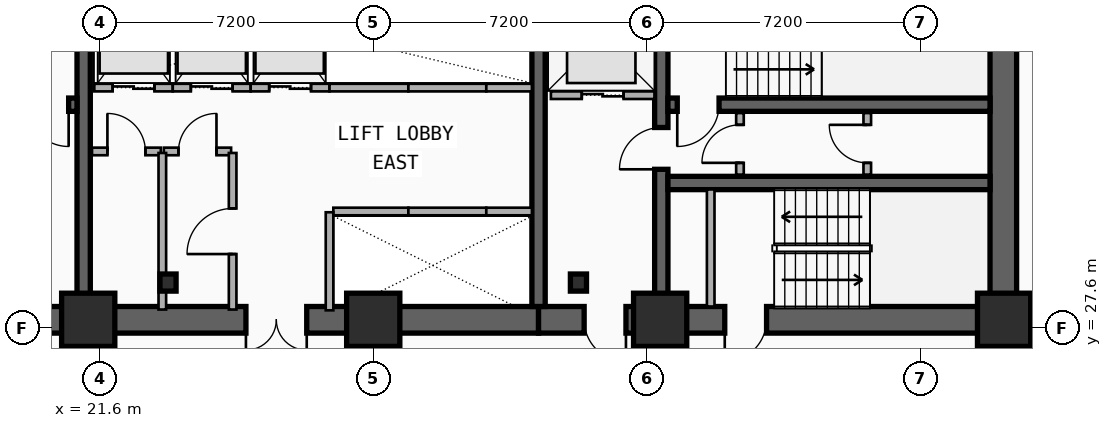
"""IFC4 building model, lengths in metres.
Left out: names, types, materials, properties, quantities, classifications, styles, units other than length and angle.
Written with IfcOpenShell. Run it as: python <this file> out.ifc"""

import sys

from ifc_helpers import new_model, si_unit, direction, frame, frame_2d, origin, origin_2d, place, context, subcontext, project, spatial, rectangle, i_section, extrude, element, fill, save


model = new_model("IFC4")
c1 = context("Model", 3, precision=1e-05, world=origin(), true_north=direction((0.0, 1.0)))
c2 = subcontext(c1, "Body", "Model", "MODEL_VIEW")
j1 = project(units=[si_unit("LENGTHUNIT", "METRE"), si_unit("PLANEANGLEUNIT", "RADIAN")], contexts=[c1])
p1 = place(None, origin())
s1 = spatial("IfcSite", under=j1, at=p1, CompositionType="ELEMENT")
p2 = place(p1, origin())
s2 = spatial("IfcBuilding", under=s1, at=p2, CompositionType="ELEMENT")
p3 = place(p2, frame((0.0, 0.0, 53.5)))
s3 = spatial("IfcBuildingStorey", under=s2, at=p3, CompositionType="ELEMENT", Elevation=53.5)
p4 = place(p3, frame((21.18, 27.82, 0.0), z_axis=(0.0, 0.0, 1.0), x_axis=(-1.0, 0.0, 0.0)))
e1 = element("IfcWall", 1, at=p4, inside=s3, PredefinedType="SHEAR", context=c2, shape_type="SweptSolid", body=[
    extrude(rectangle(XDim=9.03, YDim=0.7, at=frame_2d((4.515, 0.0))), origin(), (0.0, 0.0, 1.0), 3.5),
])
p5 = place(p4, frame((2.68, 0.0, 0.0)))
e2 = element("IfcOpeningElement", 2, at=p5, cuts=e1, PredefinedType="OPENING", context=c2, shape_type="SweptSolid", body=[
    extrude(rectangle(XDim=1.1, YDim=2.15, at=frame_2d((0.55, 1.075))), frame((0.0, 0.36, 0.0), z_axis=(0.0, -1.0, 0.0), x_axis=(1.0, 0.0, 0.0)), (0.0, 0.0, 1.0), 0.72),
])
p6 = place(p3, frame((33.15, 27.82, 0.0), z_axis=(0.0, 0.0, 1.0), x_axis=(-1.0, 0.0, 0.0)))
e3 = element("IfcWall", 3, at=p6, inside=s3, PredefinedType="SHEAR", context=c2, shape_type="SweptSolid", body=[
    extrude(rectangle(XDim=11.97, YDim=0.7, at=frame_2d((5.985, 0.0))), origin(), (0.0, 0.0, 1.0), 3.5),
])
p7 = place(p6, frame((6.1, 0.0, 0.0)))
e4 = element("IfcOpeningElement", 4, at=p7, cuts=e3, PredefinedType="OPENING", context=c2, shape_type="SweptSolid", body=[
    extrude(rectangle(XDim=1.6, YDim=2.2, at=frame_2d((0.8, 1.1))), frame((0.0, 0.36, 0.0), z_axis=(0.0, -1.0, 0.0), x_axis=(1.0, 0.0, 0.0)), (0.0, 0.0, 1.0), 0.72),
])
p8 = place(p3, frame((45.38, 27.82, 0.0), z_axis=(0.0, 0.0, 1.0), x_axis=(-1.0, 0.0, 0.0)))
e5 = element("IfcWall", 5, at=p8, inside=s3, PredefinedType="SHEAR", context=c2, shape_type="SweptSolid", body=[
    extrude(rectangle(XDim=12.23, YDim=0.7, at=frame_2d((6.115, 0.0))), origin(), (0.0, 0.0, 1.0), 3.5),
])
p9 = place(p8, frame((9.93, 0.0, 0.0)))
e6 = element("IfcOpeningElement", 6, at=p9, cuts=e5, PredefinedType="OPENING", context=c2, shape_type="SweptSolid", body=[
    extrude(rectangle(XDim=1.1, YDim=2.15, at=frame_2d((0.55, 1.075))), frame((0.0, 0.36, 0.0), z_axis=(0.0, -1.0, 0.0), x_axis=(1.0, 0.0, 0.0)), (0.0, 0.0, 1.0), 0.72),
])
p10 = place(p8, frame((6.23, 0.0, 0.0)))
e7 = element("IfcOpeningElement", 7, at=p10, cuts=e5, PredefinedType="OPENING", context=c2, shape_type="SweptSolid", body=[
    extrude(rectangle(XDim=1.1, YDim=2.15, at=frame_2d((0.55, 1.075))), frame((0.0, 0.36, 0.0), z_axis=(0.0, -1.0, 0.0), x_axis=(1.0, 0.0, 0.0)), (0.0, 0.0, 1.0), 0.72),
])
p11 = place(p3, frame((45.38, 28.17, 0.0), z_axis=(0.0, 0.0, 1.0), x_axis=(0.0, 1.0, 0.0)))
e8 = element("IfcWall", 8, at=p11, inside=s3, PredefinedType="SHEAR", context=c2, shape_type="SweptSolid", body=[
    extrude(rectangle(XDim=8.53, YDim=0.7, at=frame_2d((4.265, 0.0))), origin(), (0.0, 0.0, 1.0), 3.5),
])
for number, where, z_axis, x_axis in (
    (9, (21.18, 28.17, 0.0), (0.0, 0.0, 1.0), (0.0, 1.0, 0.0)),
    (10, (33.15, 28.17, 0.0), (0.0, 0.0, 1.0), (0.0, 1.0, 0.0)),
):
    element("IfcWall", number, at=place(p3, frame(where, z_axis=z_axis, x_axis=x_axis)), inside=s3, PredefinedType="SHEAR", context=c2, shape_type="SweptSolid", body=[
        extrude(rectangle(XDim=8.53, YDim=0.35, at=frame_2d((4.265, 0.0))), origin(), (0.0, 0.0, 1.0), 3.5),
    ])
p12 = place(p3, frame((36.38, 28.17, 0.0), z_axis=(0.0, 0.0, 1.0), x_axis=(0.0, 1.0, 0.0)))
e11 = element("IfcWall", 11, at=p12, inside=s3, PredefinedType="SHEAR", context=c2, shape_type="SweptSolid", body=[
    extrude(rectangle(XDim=8.53, YDim=0.35, at=frame_2d((4.265, 0.0))), origin(), (0.0, 0.0, 1.0), 3.5),
])
p13 = place(p12, frame((3.61, 0.0, 0.0)))
e12 = element("IfcOpeningElement", 12, at=p13, cuts=e11, PredefinedType="OPENING", context=c2, shape_type="SweptSolid", body=[
    extrude(rectangle(XDim=1.1, YDim=2.15, at=frame_2d((0.55, 1.075))), frame((0.0, 0.185, 0.0), z_axis=(0.0, -1.0, 0.0), x_axis=(1.0, 0.0, 0.0)), (0.0, 0.0, 1.0), 0.37),
])
p14 = place(p3, frame((21.005, 33.48, 0.0), z_axis=(0.0, 0.0, 1.0), x_axis=(-1.0, 0.0, 0.0)))
e13 = element("IfcWall", 13, at=p14, inside=s3, PredefinedType="SHEAR", context=c2, shape_type="SweptSolid", body=[
    extrude(rectangle(XDim=8.505, YDim=0.35, at=frame_2d((4.252, 0.0))), origin(), (0.0, 0.0, 1.0), 3.5),
])
p15 = place(p14, frame((0.22, 0.0, 0.0)))
e14 = element("IfcOpeningElement", 14, at=p15, cuts=e13, PredefinedType="OPENING", context=c2, shape_type="SweptSolid", body=[
    extrude(rectangle(XDim=1.1, YDim=2.15, at=frame_2d((0.55, 1.075))), frame((0.0, 0.185, 0.0), z_axis=(0.0, -1.0, 0.0), x_axis=(1.0, 0.0, 0.0)), (0.0, 0.0, 1.0), 0.37),
])
p16 = place(p3, frame((45.03, 33.48, 0.0), z_axis=(0.0, 0.0, 1.0), x_axis=(-1.0, 0.0, 0.0)))
e15 = element("IfcWall", 15, at=p16, inside=s3, PredefinedType="SHEAR", context=c2, shape_type="SweptSolid", body=[
    extrude(rectangle(XDim=8.475, YDim=0.35, at=frame_2d((4.238, 0.0))), origin(), (0.0, 0.0, 1.0), 3.5),
])
p17 = place(p16, frame((7.13, 0.0, 0.0)))
e16 = element("IfcOpeningElement", 16, at=p17, cuts=e15, PredefinedType="OPENING", context=c2, shape_type="SweptSolid", body=[
    extrude(rectangle(XDim=1.1, YDim=2.15, at=frame_2d((0.55, 1.075))), frame((0.0, 0.185, 0.0), z_axis=(0.0, -1.0, 0.0), x_axis=(1.0, 0.0, 0.0)), (0.0, 0.0, 1.0), 0.37),
])
p18 = place(p3, frame((36.555, 31.42, 0.0), z_axis=(0.0, 0.0, 1.0), x_axis=(1.0, 0.0, 0.0)))
e17 = element("IfcWall", 17, at=p18, inside=s3, PredefinedType="SHEAR", context=c2, shape_type="SweptSolid", body=[
    extrude(rectangle(XDim=8.475, YDim=0.35, at=frame_2d((4.238, 0.0))), origin(), (0.0, 0.0, 1.0), 3.5),
])
for number, where, z_axis, x_axis in (
    (18, (23.4, 28.8, 0.0), (0.0, 0.0, 1.0), (1.0, 0.0, 0.0)),
    (19, (34.2, 28.8, 0.0), (0.0, 0.0, 1.0), (1.0, 0.0, 0.0)),
):
    element("IfcColumn", number, at=place(p3, frame(where, z_axis=z_axis, x_axis=x_axis)), inside=s3, PredefinedType="COLUMN", context=c2, shape_type="SweptSolid", body=[
        extrude(i_section(OverallWidth=0.424, OverallDepth=0.45, WebThickness=0.041, FlangeThickness=0.065, FilletRadius=0.015, at=origin_2d()), origin(), (0.0, 0.0, 1.0), 3.5),
    ])
for number, where, z_axis, x_axis in (
    (20, (21.3, 27.82, 0.0), (0.0, 0.0, 1.0), (1.0, 0.0, 0.0)),
    (21, (28.8, 27.82, 0.0), (0.0, 0.0, 1.0), (1.0, 0.0, 0.0)),
    (22, (36.35, 27.82, 0.0), (0.0, 0.0, 1.0), (1.0, 0.0, 0.0)),
    (23, (45.4, 27.82, 0.0), (0.0, 0.0, 1.0), (1.0, 0.0, 0.0)),
):
    element("IfcColumn", number, at=place(p3, frame(where, z_axis=z_axis, x_axis=x_axis)), inside=s3, PredefinedType="COLUMN", context=c2, shape_type="SweptSolid", body=[
        extrude(rectangle(XDim=1.4, YDim=1.4, at=origin_2d()), origin(), (0.0, 0.0, 1.0), 3.5),
    ])
p19 = place(p3, frame((33.475, 33.73, 0.0), z_axis=(0.0, 0.0, 1.0), x_axis=(1.0, 0.0, 0.0)))
e24 = element("IfcWall", 24, at=p19, inside=s3, PredefinedType="PARTITIONING", context=c2, shape_type="SweptSolid", body=[
    extrude(rectangle(XDim=2.725, YDim=0.2, at=frame_2d((1.362, 0.0))), origin(), (0.0, 0.0, 1.0), 2.212),
])
p20 = place(p19, frame((0.812, 0.0, 0.0)))
e25 = element("IfcOpeningElement", 25, at=p20, cuts=e24, PredefinedType="OPENING", context=c2, shape_type="SweptSolid", body=[
    extrude(rectangle(XDim=1.1, YDim=2.15, at=frame_2d((0.55, 1.075))), frame((0.0, 0.11, 0.0), z_axis=(0.0, -1.0, 0.0), x_axis=(1.0, 0.0, 0.0)), (0.0, 0.0, 1.0), 0.22),
])
p21 = place(p3, frame((27.75, 30.67, 0.0), z_axis=(0.0, 0.0, 1.0), x_axis=(1.0, 0.0, 0.0)))
e26 = element("IfcWall", 26, at=p21, inside=s3, PredefinedType="PARTITIONING", context=c2, shape_type="SweptSolid", body=[
    extrude(rectangle(XDim=1.975, YDim=0.2, at=frame_2d((0.988, 0.0))), origin(), (0.0, 0.0, 1.0), 2.212),
])
p22 = place(p3, frame((27.65, 28.07, 0.0), z_axis=(0.0, 0.0, 1.0), x_axis=(0.0, 1.0, 0.0)))
e27 = element("IfcWall", 27, at=p22, inside=s3, PredefinedType="PARTITIONING", context=c2, shape_type="SweptSolid", body=[
    extrude(rectangle(XDim=2.58, YDim=0.2, at=frame_2d((1.29, 0.0))), origin(), (0.0, 0.0, 1.0), 2.212),
])
p23 = place(p3, frame((29.725, 30.67, 0.0), z_axis=(0.0, 0.0, 1.0), x_axis=(1.0, 0.0, 0.0)))
e28 = element("IfcWall", 28, at=p23, inside=s3, PredefinedType="PARTITIONING", context=c2, shape_type="SweptSolid", body=[
    extrude(rectangle(XDim=2.05, YDim=0.2, at=frame_2d((1.025, 0.0))), origin(), (0.0, 0.0, 1.0), 2.62),
])
p24 = place(p3, frame((31.775, 30.67, 0.0), z_axis=(0.0, 0.0, 1.0), x_axis=(1.0, 0.0, 0.0)))
e29 = element("IfcWall", 29, at=p24, inside=s3, PredefinedType="PARTITIONING", context=c2, shape_type="SweptSolid", body=[
    extrude(rectangle(XDim=1.2, YDim=0.2, at=frame_2d((0.6, 0.0))), origin(), (0.0, 0.0, 1.0), 2.62),
])
p25 = place(p3, frame((21.46, 33.93, 0.0), z_axis=(0.0, 0.0, 1.0), x_axis=(1.0, 0.0, 0.0)))
e30 = element("IfcWall", 30, at=p25, inside=s3, PredefinedType="PARTITIONING", context=c2, shape_type="SweptSolid", body=[
    extrude(rectangle(XDim=2.065, YDim=0.2, at=frame_2d((1.032, 0.0))), origin(), (0.0, 0.0, 1.0), 2.212),
])
p26 = place(p25, frame((0.482, 0.0, 0.0)))
e31 = element("IfcOpeningElement", 31, at=p26, cuts=e30, PredefinedType="OPENING", context=c2, shape_type="SweptSolid", body=[
    extrude(rectangle(XDim=1.1, YDim=2.15, at=frame_2d((0.55, 1.075))), frame((0.0, 0.11, 0.0), z_axis=(0.0, -1.0, 0.0), x_axis=(1.0, 0.0, 0.0)), (0.0, 0.0, 1.0), 0.22),
])
p27 = place(p3, frame((23.525, 33.93, 0.0), z_axis=(0.0, 0.0, 1.0), x_axis=(1.0, 0.0, 0.0)))
e32 = element("IfcWall", 32, at=p27, inside=s3, PredefinedType="PARTITIONING", context=c2, shape_type="SweptSolid", body=[
    extrude(rectangle(XDim=2.05, YDim=0.2, at=frame_2d((1.025, 0.0))), origin(), (0.0, 0.0, 1.0), 3.24),
])
p28 = place(p27, frame((0.475, 0.0, 0.0)))
e33 = element("IfcOpeningElement", 33, at=p28, cuts=e32, PredefinedType="OPENING", context=c2, shape_type="SweptSolid", body=[
    extrude(rectangle(XDim=1.1, YDim=2.15, at=frame_2d((0.55, 1.075))), frame((0.0, 0.11, 0.0), z_axis=(0.0, -1.0, 0.0), x_axis=(1.0, 0.0, 0.0)), (0.0, 0.0, 1.0), 0.22),
])
p29 = place(p3, frame((25.575, 33.93, 0.0), z_axis=(0.0, 0.0, 1.0), x_axis=(1.0, 0.0, 0.0)))
e34 = element("IfcWall", 34, at=p29, inside=s3, PredefinedType="PARTITIONING", context=c2, shape_type="SweptSolid", body=[
    extrude(rectangle(XDim=2.075, YDim=0.2, at=frame_2d((1.038, 0.0))), origin(), (0.0, 0.0, 1.0), 3.24),
])
p30 = place(p29, frame((0.488, 0.0, 0.0)))
e35 = element("IfcOpeningElement", 35, at=p30, cuts=e34, PredefinedType="OPENING", context=c2, shape_type="SweptSolid", body=[
    extrude(rectangle(XDim=1.1, YDim=2.15, at=frame_2d((0.55, 1.075))), frame((0.0, 0.11, 0.0), z_axis=(0.0, -1.0, 0.0), x_axis=(1.0, 0.0, 0.0)), (0.0, 0.0, 1.0), 0.22),
])
p31 = place(p3, frame((27.65, 33.93, 0.0), z_axis=(0.0, 0.0, 1.0), x_axis=(1.0, 0.0, 0.0)))
e36 = element("IfcWall", 36, at=p31, inside=s3, PredefinedType="PARTITIONING", context=c2, shape_type="SweptSolid", body=[
    extrude(rectangle(XDim=2.075, YDim=0.2, at=frame_2d((1.038, 0.0))), origin(), (0.0, 0.0, 1.0), 2.212),
])
p32 = place(p3, frame((29.725, 33.93, 0.0), z_axis=(0.0, 0.0, 1.0), x_axis=(1.0, 0.0, 0.0)))
e37 = element("IfcWall", 37, at=p32, inside=s3, PredefinedType="PARTITIONING", context=c2, shape_type="SweptSolid", body=[
    extrude(rectangle(XDim=2.05, YDim=0.2, at=frame_2d((1.025, 0.0))), origin(), (0.0, 0.0, 1.0), 3.24),
])
p33 = place(p3, frame((31.775, 33.93, 0.0), z_axis=(0.0, 0.0, 1.0), x_axis=(1.0, 0.0, 0.0)))
e38 = element("IfcWall", 38, at=p33, inside=s3, PredefinedType="PARTITIONING", context=c2, shape_type="SweptSolid", body=[
    extrude(rectangle(XDim=1.2, YDim=0.2, at=frame_2d((0.6, 0.0))), origin(), (0.0, 0.0, 1.0), 3.24),
])
p34 = place(p3, frame((37.68, 28.17, 0.0), z_axis=(0.0, 0.0, 1.0), x_axis=(0.0, 1.0, 0.0)))
e39 = element("IfcWall", 39, at=p34, inside=s3, PredefinedType="PARTITIONING", context=c2, shape_type="SweptSolid", body=[
    extrude(rectangle(XDim=3.08, YDim=0.2, at=frame_2d((1.54, 0.0))), origin(), (0.0, 0.0, 1.0), 2.62),
])
p35 = place(p3, frame((38.45, 31.64, 0.0), z_axis=(0.0, 0.0, 1.0), x_axis=(0.0, 1.0, 0.0)))
e40 = element("IfcWall", 40, at=p35, inside=s3, PredefinedType="PARTITIONING", context=c2, shape_type="SweptSolid", body=[
    extrude(rectangle(XDim=1.62, YDim=0.2, at=frame_2d((0.81, 0.0))), origin(), (0.0, 0.0, 1.0), 3.24),
])
p36 = place(p35, frame((0.31, 0.0, 0.0)))
e41 = element("IfcOpeningElement", 41, at=p36, cuts=e40, PredefinedType="OPENING", context=c2, shape_type="SweptSolid", body=[
    extrude(rectangle(XDim=1.0, YDim=2.15, at=frame_2d((0.5, 1.075))), frame((0.0, 0.11, 0.0), z_axis=(0.0, -1.0, 0.0), x_axis=(1.0, 0.0, 0.0)), (0.0, 0.0, 1.0), 0.22),
])
p37 = place(p3, frame((41.8, 31.64, 0.0), z_axis=(0.0, 0.0, 1.0), x_axis=(0.0, 1.0, 0.0)))
e42 = element("IfcWall", 42, at=p37, inside=s3, PredefinedType="PARTITIONING", context=c2, shape_type="SweptSolid", body=[
    extrude(rectangle(XDim=1.62, YDim=0.2, at=frame_2d((0.81, 0.0))), origin(), (0.0, 0.0, 1.0), 3.24),
])
p38 = place(p37, frame((0.31, 0.0, 0.0)))
e43 = element("IfcOpeningElement", 43, at=p38, cuts=e42, PredefinedType="OPENING", context=c2, shape_type="SweptSolid", body=[
    extrude(rectangle(XDim=1.0, YDim=2.15, at=frame_2d((0.5, 1.075))), frame((0.0, 0.11, 0.0), z_axis=(0.0, -1.0, 0.0), x_axis=(1.0, 0.0, 0.0)), (0.0, 0.0, 1.0), 0.22),
])
p39 = place(p3, frame((21.4, 32.25, 0.0), z_axis=(0.0, 0.0, 1.0), x_axis=(1.0, 0.0, 0.0)))
e44 = element("IfcWall", 44, at=p39, inside=s3, PredefinedType="PARTITIONING", context=c2, shape_type="SweptSolid", body=[
    extrude(rectangle(XDim=1.81, YDim=0.2, at=frame_2d((0.905, 0.0))), origin(), (0.0, 0.0, 1.0), 2.28),
])
p40 = place(p39, frame((0.405, 0.0, 0.0)))
e45 = element("IfcOpeningElement", 45, at=p40, cuts=e44, PredefinedType="OPENING", context=c2, shape_type="SweptSolid", body=[
    extrude(rectangle(XDim=1.0, YDim=2.15, at=frame_2d((0.5, 1.075))), frame((0.0, 0.11, 0.0), z_axis=(0.0, -1.0, 0.0), x_axis=(1.0, 0.0, 0.0)), (0.0, 0.0, 1.0), 0.22),
])
p41 = place(p3, frame((23.29, 32.25, 0.0), z_axis=(0.0, 0.0, 1.0), x_axis=(1.0, 0.0, 0.0)))
e46 = element("IfcWall", 46, at=p41, inside=s3, PredefinedType="PARTITIONING", context=c2, shape_type="SweptSolid", body=[
    extrude(rectangle(XDim=1.77, YDim=0.2, at=frame_2d((0.885, 0.0))), origin(), (0.0, 0.0, 1.0), 3.24),
])
p42 = place(p41, frame((0.385, 0.0, 0.0)))
e47 = element("IfcOpeningElement", 47, at=p42, cuts=e46, PredefinedType="OPENING", context=c2, shape_type="SweptSolid", body=[
    extrude(rectangle(XDim=1.0, YDim=2.15, at=frame_2d((0.5, 1.075))), frame((0.0, 0.11, 0.0), z_axis=(0.0, -1.0, 0.0), x_axis=(1.0, 0.0, 0.0)), (0.0, 0.0, 1.0), 0.22),
])
p43 = place(p3, frame((25.1, 28.09, 0.0), z_axis=(0.0, 0.0, 1.0), x_axis=(0.0, 1.0, 0.0)))
e48 = element("IfcWall", 48, at=p43, inside=s3, PredefinedType="PARTITIONING", context=c2, shape_type="SweptSolid", body=[
    extrude(rectangle(XDim=4.12, YDim=0.2, at=frame_2d((2.06, 0.0))), origin(), (0.0, 0.0, 1.0), 2.62),
])
p44 = place(p43, frame((1.46, 0.0, 0.0)))
e49 = element("IfcOpeningElement", 49, at=p44, cuts=e48, PredefinedType="OPENING", context=c2, shape_type="SweptSolid", body=[
    extrude(rectangle(XDim=1.2, YDim=2.15, at=frame_2d((0.6, 1.075))), frame((0.0, 0.11, 0.0), z_axis=(0.0, -1.0, 0.0), x_axis=(1.0, 0.0, 0.0)), (0.0, 0.0, 1.0), 0.22),
])
p45 = place(p3, frame((23.25, 28.09, 0.0), z_axis=(0.0, 0.0, 1.0), x_axis=(0.0, 1.0, 0.0)))
e50 = element("IfcWall", 50, at=p45, inside=s3, PredefinedType="PARTITIONING", context=c2, shape_type="SweptSolid", body=[
    extrude(rectangle(XDim=4.12, YDim=0.2, at=frame_2d((2.06, 0.0))), origin(), (0.0, 0.0, 1.0), 2.62),
])
p46 = place(p3, frame((45.41, 27.6, 0.0), z_axis=(0.0, 0.0, 1.0), x_axis=(1.0, 0.0, 0.0)))
e51 = element("IfcWall", 51, at=p46, inside=s3, PredefinedType="PARTITIONING", context=c2, shape_type="SweptSolid", body=[
    extrude(rectangle(XDim=0.91, YDim=0.16, at=frame_2d((0.455, 0.0))), origin(), (0.0, 0.0, 1.0), 2.28),
])
p47 = place(p20, origin())
e52 = element("IfcDoor", 52, at=p47, inside=s3, OperationType="DOUBLE_DOOR_SLIDING", PredefinedType="DOOR", context=c2, shape_type="SweptSolid", body=[
    extrude(rectangle(XDim=1.1, YDim=2.15, at=frame_2d((0.55, 1.075))), frame((0.0, 0.025, 0.0), z_axis=(0.0, -1.0, 0.0), x_axis=(1.0, 0.0, 0.0)), (0.0, 0.0, 1.0), 0.05),
])
fill(e25, e52)
p48 = place(p26, origin())
e53 = element("IfcDoor", 53, at=p48, inside=s3, OperationType="DOUBLE_DOOR_SLIDING", PredefinedType="DOOR", context=c2, shape_type="SweptSolid", body=[
    extrude(rectangle(XDim=1.1, YDim=2.15, at=frame_2d((0.55, 1.075))), frame((0.0, 0.025, 0.0), z_axis=(0.0, -1.0, 0.0), x_axis=(1.0, 0.0, 0.0)), (0.0, 0.0, 1.0), 0.05),
])
fill(e31, e53)
p49 = place(p28, origin())
e54 = element("IfcDoor", 54, at=p49, inside=s3, OperationType="DOUBLE_DOOR_SLIDING", PredefinedType="DOOR", context=c2, shape_type="SweptSolid", body=[
    extrude(rectangle(XDim=1.1, YDim=2.15, at=frame_2d((0.55, 1.075))), frame((0.0, 0.025, 0.0), z_axis=(0.0, -1.0, 0.0), x_axis=(1.0, 0.0, 0.0)), (0.0, 0.0, 1.0), 0.05),
])
fill(e33, e54)
p50 = place(p30, origin())
e55 = element("IfcDoor", 55, at=p50, inside=s3, OperationType="DOUBLE_DOOR_SLIDING", PredefinedType="DOOR", context=c2, shape_type="SweptSolid", body=[
    extrude(rectangle(XDim=1.1, YDim=2.15, at=frame_2d((0.55, 1.075))), frame((0.0, 0.025, 0.0), z_axis=(0.0, -1.0, 0.0), x_axis=(1.0, 0.0, 0.0)), (0.0, 0.0, 1.0), 0.05),
])
fill(e35, e55)
p51 = place(p15, origin())
e56 = element("IfcDoor", 56, at=p51, inside=s3, OperationType="SINGLE_SWING_LEFT", PredefinedType="DOOR", context=c2, shape_type="SweptSolid", body=[
    extrude(rectangle(XDim=1.1, YDim=2.15, at=frame_2d((0.55, 1.075))), frame((0.0, 0.025, 0.0), z_axis=(0.0, -1.0, 0.0), x_axis=(1.0, 0.0, 0.0)), (0.0, 0.0, 1.0), 0.05),
])
fill(e14, e56)
p52 = place(p17, origin())
e57 = element("IfcDoor", 57, at=p52, inside=s3, OperationType="SINGLE_SWING_RIGHT", PredefinedType="DOOR", context=c2, shape_type="SweptSolid", body=[
    extrude(rectangle(XDim=1.1, YDim=2.15, at=frame_2d((0.55, 1.075))), frame((0.0, 0.025, 0.0), z_axis=(0.0, -1.0, 0.0), x_axis=(1.0, 0.0, 0.0)), (0.0, 0.0, 1.0), 0.05),
])
fill(e16, e57)
p53 = place(p13, origin())
e58 = element("IfcDoor", 58, at=p53, inside=s3, OperationType="SINGLE_SWING_LEFT", PredefinedType="DOOR", context=c2, shape_type="SweptSolid", body=[
    extrude(rectangle(XDim=1.1, YDim=2.15, at=frame_2d((0.55, 1.075))), frame((0.0, 0.025, 0.0), z_axis=(0.0, -1.0, 0.0), x_axis=(1.0, 0.0, 0.0)), (0.0, 0.0, 1.0), 0.05),
])
fill(e12, e58)
p54 = place(p9, origin())
e59 = element("IfcDoor", 59, at=p54, inside=s3, OperationType="SINGLE_SWING_LEFT", PredefinedType="DOOR", context=c2, shape_type="SweptSolid", body=[
    extrude(rectangle(XDim=1.1, YDim=2.15, at=frame_2d((0.55, 1.075))), frame((0.0, 0.025, 0.0), z_axis=(0.0, -1.0, 0.0), x_axis=(1.0, 0.0, 0.0)), (0.0, 0.0, 1.0), 0.05),
])
fill(e6, e59)
p55 = place(p10, origin())
e60 = element("IfcDoor", 60, at=p55, inside=s3, OperationType="SINGLE_SWING_RIGHT", PredefinedType="DOOR", context=c2, shape_type="SweptSolid", body=[
    extrude(rectangle(XDim=1.1, YDim=2.15, at=frame_2d((0.55, 1.075))), frame((0.0, 0.025, 0.0), z_axis=(0.0, -1.0, 0.0), x_axis=(1.0, 0.0, 0.0)), (0.0, 0.0, 1.0), 0.05),
])
fill(e7, e60)
p56 = place(p7, origin())
e61 = element("IfcDoor", 61, at=p56, inside=s3, OperationType="SINGLE_SWING_LEFT", PredefinedType="DOOR", context=c2, shape_type="SweptSolid", body=[
    extrude(rectangle(XDim=1.6, YDim=2.2, at=frame_2d((0.8, 1.1))), frame((0.0, 0.025, 0.0), z_axis=(0.0, -1.0, 0.0), x_axis=(1.0, 0.0, 0.0)), (0.0, 0.0, 1.0), 0.05),
])
fill(e4, e61)
p57 = place(p36, origin())
e62 = element("IfcDoor", 62, at=p57, inside=s3, OperationType="SINGLE_SWING_LEFT", PredefinedType="DOOR", context=c2, shape_type="SweptSolid", body=[
    extrude(rectangle(XDim=1.0, YDim=2.15, at=frame_2d((0.5, 1.075))), frame((0.0, 0.025, 0.0), z_axis=(0.0, -1.0, 0.0), x_axis=(1.0, 0.0, 0.0)), (0.0, 0.0, 1.0), 0.05),
])
fill(e41, e62)
p58 = place(p38, origin())
e63 = element("IfcDoor", 63, at=p58, inside=s3, OperationType="SINGLE_SWING_RIGHT", PredefinedType="DOOR", context=c2, shape_type="SweptSolid", body=[
    extrude(rectangle(XDim=1.0, YDim=2.15, at=frame_2d((0.5, 1.075))), frame((0.0, 0.025, 0.0), z_axis=(0.0, -1.0, 0.0), x_axis=(1.0, 0.0, 0.0)), (0.0, 0.0, 1.0), 0.05),
])
fill(e43, e63)
p59 = place(p40, origin())
e64 = element("IfcDoor", 64, at=p59, inside=s3, OperationType="SINGLE_SWING_LEFT", PredefinedType="DOOR", context=c2, shape_type="SweptSolid", body=[
    extrude(rectangle(XDim=1.0, YDim=2.15, at=frame_2d((0.5, 1.075))), frame((0.0, 0.025, 0.0), z_axis=(0.0, -1.0, 0.0), x_axis=(1.0, 0.0, 0.0)), (0.0, 0.0, 1.0), 0.05),
])
fill(e45, e64)
p60 = place(p42, origin())
e65 = element("IfcDoor", 65, at=p60, inside=s3, OperationType="SINGLE_SWING_RIGHT", PredefinedType="DOOR", context=c2, shape_type="SweptSolid", body=[
    extrude(rectangle(XDim=1.0, YDim=2.15, at=frame_2d((0.5, 1.075))), frame((0.0, 0.025, 0.0), z_axis=(0.0, -1.0, 0.0), x_axis=(1.0, 0.0, 0.0)), (0.0, 0.0, 1.0), 0.05),
])
fill(e47, e65)
p61 = place(p44, origin())
e66 = element("IfcDoor", 66, at=p61, inside=s3, OperationType="SINGLE_SWING_LEFT", PredefinedType="DOOR", context=c2, shape_type="SweptSolid", body=[
    extrude(rectangle(XDim=1.2, YDim=2.15, at=frame_2d((0.6, 1.075))), frame((0.0, 0.025, 0.0), z_axis=(0.0, -1.0, 0.0), x_axis=(1.0, 0.0, 0.0)), (0.0, 0.0, 1.0), 0.05),
])
fill(e49, e66)
save(model, sys.argv[1])
